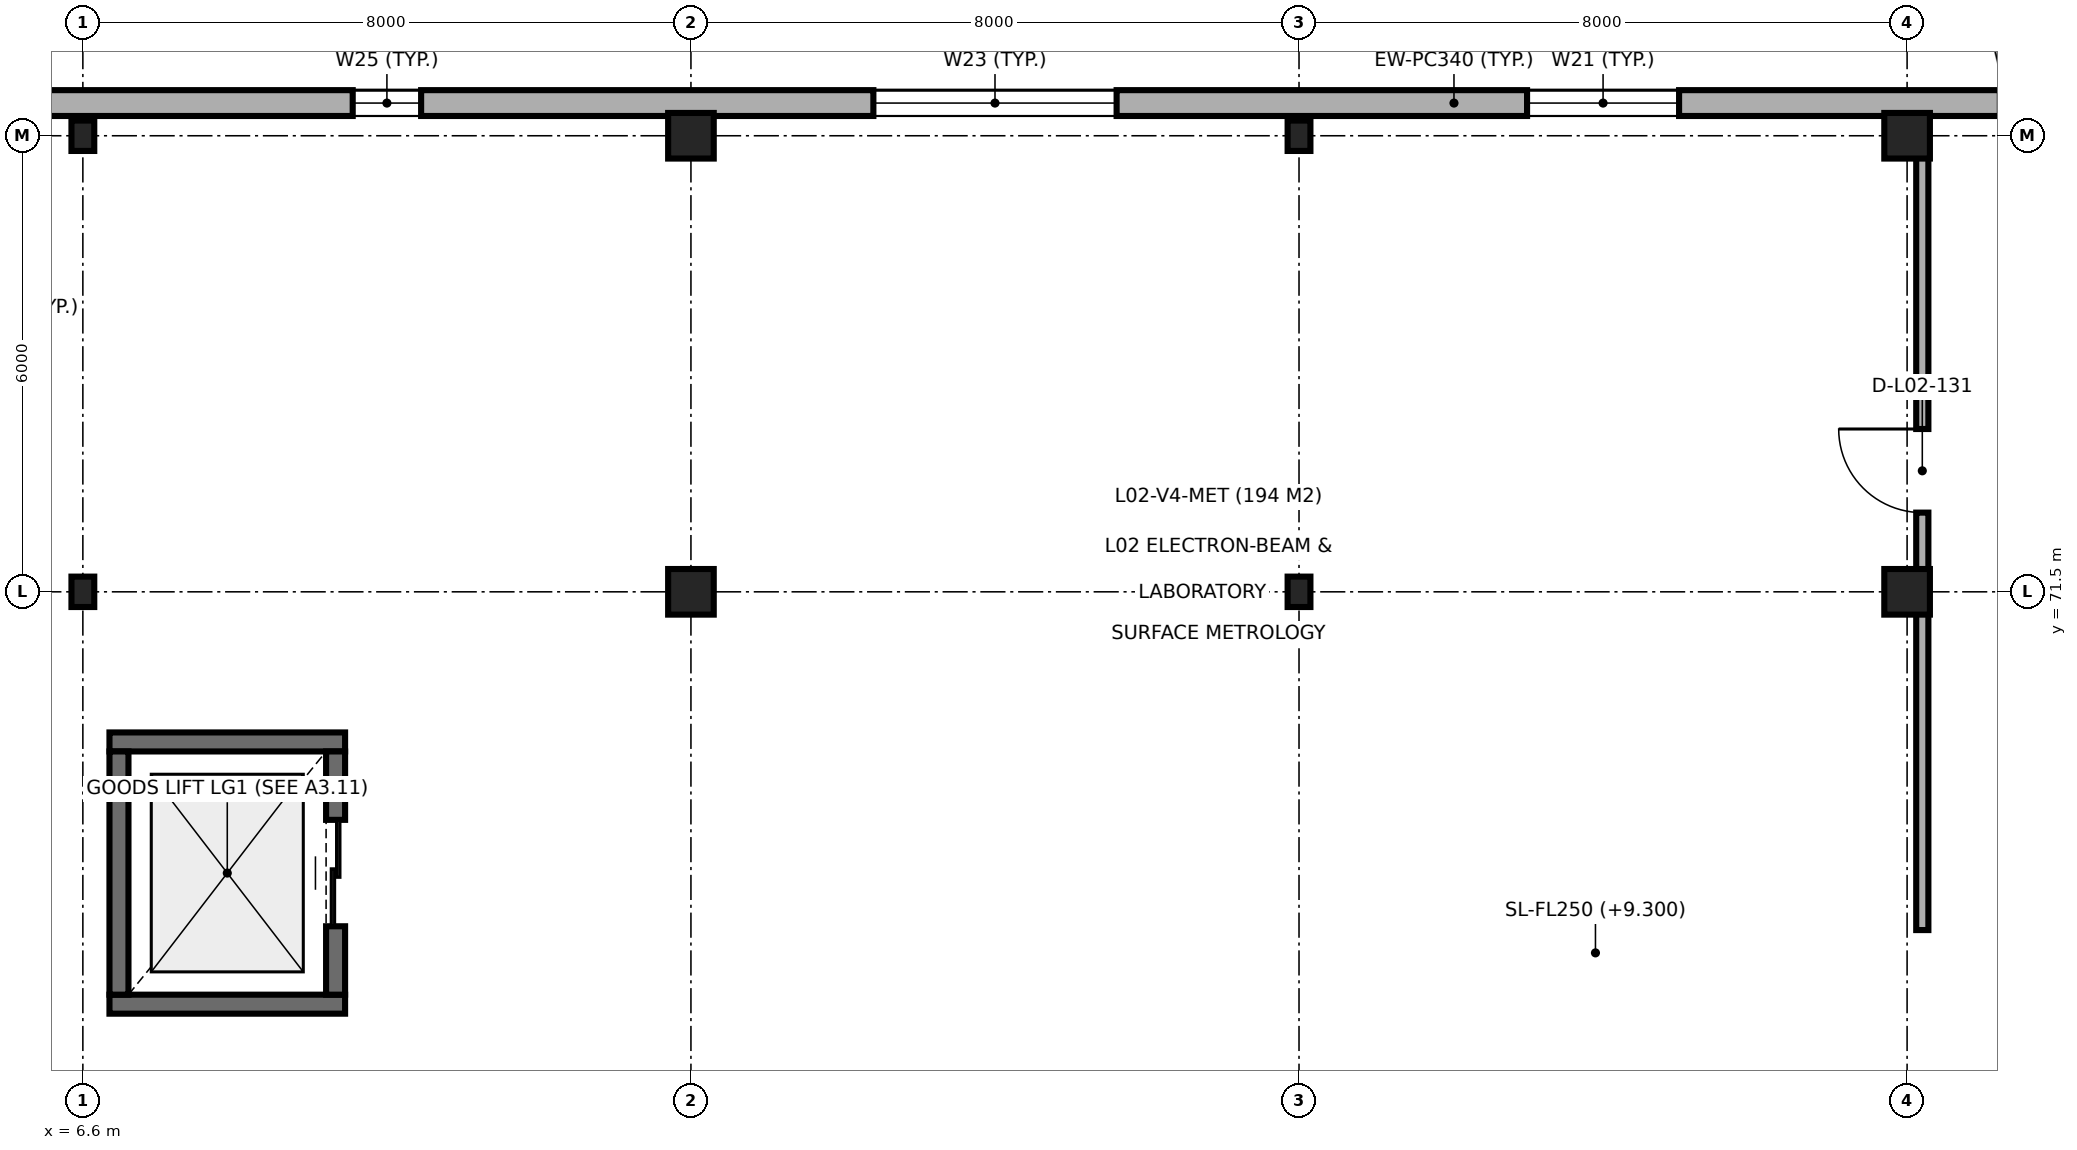
"""IFC4 building model, lengths in metres.
Left out: names, types, materials, properties, quantities, classifications, styles, units other than length and angle.
Written with IfcOpenShell. Run it as: python <this file> out.ifc"""

import sys

from ifc_helpers import new_model, si_unit, direction, frame, frame_2d, origin, origin_2d, place, context, subcontext, project, spatial, rectangle, i_section, extrude, element, fill, save


model = new_model("IFC4")
c1 = context("Model", 3, precision=1e-05, world=origin(), true_north=direction((0.0, 1.0)))
c2 = subcontext(c1, "Body", "Model", "MODEL_VIEW")
j1 = project(units=[si_unit("LENGTHUNIT", "METRE"), si_unit("PLANEANGLEUNIT", "RADIAN")], contexts=[c1])
p1 = place(None, origin())
s1 = spatial("IfcSite", under=j1, at=p1, CompositionType="ELEMENT")
p2 = place(p1, origin())
s2 = spatial("IfcBuilding", under=s1, at=p2, CompositionType="ELEMENT")
p3 = place(p2, frame((0.0, 0.0, 9.3)))
s3 = spatial("IfcBuildingStorey", under=s2, at=p3, CompositionType="ELEMENT", Elevation=9.3)
for number, where, z_axis, x_axis in (
    (1, (6.6, 71.5, 0.0), (0.0, 0.0, 1.0), (1.0, 0.0, 0.0)),
    (2, (6.6, 77.5, 0.0), (0.0, 0.0, 1.0), (1.0, 0.0, 0.0)),
):
    element("IfcColumn", number, at=place(p3, frame(where, z_axis=z_axis, x_axis=x_axis)), inside=s3, PredefinedType="COLUMN", context=c2, shape_type="SweptSolid", body=[
        extrude(i_section(OverallWidth=0.3, OverallDepth=0.4, WebThickness=0.013, FlangeThickness=0.024, FilletRadius=0.027, at=origin_2d()), origin(), (0.0, 0.0, 1.0), 4.5),
    ])
for number, where, z_axis, x_axis in (
    (3, (14.6, 71.5, 0.0), (0.0, 0.0, 1.0), (1.0, 0.0, 0.0)),
    (4, (14.6, 77.5, 0.0), (0.0, 0.0, 1.0), (1.0, 0.0, 0.0)),
):
    element("IfcColumn", number, at=place(p3, frame(where, z_axis=z_axis, x_axis=x_axis)), inside=s3, PredefinedType="COLUMN", context=c2, shape_type="SweptSolid", body=[
        extrude(rectangle(XDim=0.6, YDim=0.6, at=origin_2d()), origin(), (0.0, 0.0, 1.0), 4.5),
    ])
for number, where, z_axis, x_axis in (
    (5, (22.6, 71.5, 0.0), (0.0, 0.0, 1.0), (1.0, 0.0, 0.0)),
    (6, (22.6, 77.5, 0.0), (0.0, 0.0, 1.0), (1.0, 0.0, 0.0)),
):
    element("IfcColumn", number, at=place(p3, frame(where, z_axis=z_axis, x_axis=x_axis)), inside=s3, PredefinedType="COLUMN", context=c2, shape_type="SweptSolid", body=[
        extrude(i_section(OverallWidth=0.3, OverallDepth=0.4, WebThickness=0.013, FlangeThickness=0.024, FilletRadius=0.027, at=origin_2d()), origin(), (0.0, 0.0, 1.0), 4.5),
    ])
for number, where, z_axis, x_axis in (
    (7, (30.6, 71.5, 0.0), (0.0, 0.0, 1.0), (1.0, 0.0, 0.0)),
    (8, (30.6, 77.5, 0.0), (0.0, 0.0, 1.0), (1.0, 0.0, 0.0)),
):
    element("IfcColumn", number, at=place(p3, frame(where, z_axis=z_axis, x_axis=x_axis)), inside=s3, PredefinedType="COLUMN", context=c2, shape_type="SweptSolid", body=[
        extrude(rectangle(XDim=0.6, YDim=0.6, at=origin_2d()), origin(), (0.0, 0.0, 1.0), 4.5),
    ])
for number, where, z_axis, x_axis in (
    (9, (6.95, 66.075, 0.0), (0.0, 0.0, 1.0), (1.0, 0.0, 0.0)),
    (10, (10.05, 69.525, 0.0), (0.0, 0.0, 1.0), (-1.0, 0.0, 0.0)),
):
    element("IfcWall", number, at=place(p3, frame(where, z_axis=z_axis, x_axis=x_axis)), inside=s3, PredefinedType="SHEAR", context=c2, shape_type="SweptSolid", body=[
        extrude(rectangle(XDim=3.1, YDim=0.25, at=frame_2d((1.55, 0.0))), origin(), (0.0, 0.0, 1.0), 4.5),
    ])
p4 = place(p3, frame((7.075, 69.4, 0.0), z_axis=(0.0, 0.0, 1.0), x_axis=(0.0, -1.0, 0.0)))
e11 = element("IfcWall", 11, at=p4, inside=s3, PredefinedType="SHEAR", context=c2, shape_type="SweptSolid", body=[
    extrude(rectangle(XDim=3.2, YDim=0.25, at=frame_2d((1.6, 0.0))), origin(), (0.0, 0.0, 1.0), 4.5),
])
p5 = place(p3, frame((9.925, 66.2, 0.0), z_axis=(0.0, 0.0, 1.0), x_axis=(0.0, 1.0, 0.0)))
e12 = element("IfcWall", 12, at=p5, inside=s3, PredefinedType="SHEAR", context=c2, shape_type="SweptSolid", body=[
    extrude(rectangle(XDim=3.2, YDim=0.25, at=frame_2d((1.6, 0.0))), origin(), (0.0, 0.0, 1.0), 4.5),
])
p6 = place(p5, frame((0.9, 0.0, 0.0)))
e13 = element("IfcOpeningElement", 13, at=p6, cuts=e12, PredefinedType="OPENING", context=c2, shape_type="SweptSolid", body=[
    extrude(rectangle(XDim=1.4, YDim=2.2, at=frame_2d((0.7, 1.1))), frame((0.0, 0.135, 0.0), z_axis=(0.0, -1.0, 0.0), x_axis=(1.0, 0.0, 0.0)), (0.0, 0.0, 1.0), 0.27),
])
p7 = place(p3, frame((43.677, 77.93, 0.0), z_axis=(0.0, 0.0, 1.0), x_axis=(-1.0, 0.0, 0.0)))
e14 = element("IfcWall", 14, at=p7, inside=s3, PredefinedType="SOLIDWALL", context=c2, shape_type="SweptSolid", body=[
    extrude(rectangle(XDim=38.077, YDim=0.34, at=frame_2d((19.039, 0.0))), origin(), (0.0, 0.0, 1.0), 4.25),
])
p8 = place(p7, frame((6.277, 0.0, 0.0)))
e15 = element("IfcOpeningElement", 15, at=p8, cuts=e14, PredefinedType="OPENING", context=c2, shape_type="SweptSolid", body=[
    extrude(rectangle(XDim=1.6, YDim=2.2, at=frame_2d((0.8, 1.1))), frame((0.0, 0.18, 0.0), z_axis=(0.0, -1.0, 0.0), x_axis=(1.0, 0.0, 0.0)), (0.0, 0.0, 1.0), 0.36),
])
p9 = place(p7, frame((1.689, 0.0, 0.9)))
e16 = element("IfcOpeningElement", 16, at=p9, cuts=e14, PredefinedType="OPENING", context=c2, shape_type="SweptSolid", body=[
    extrude(rectangle(XDim=1.8, YDim=1.5, at=frame_2d((0.9, 0.75))), frame((0.0, 0.18, 0.0), z_axis=(0.0, -1.0, 0.0), x_axis=(1.0, 0.0, 0.0)), (0.0, 0.0, 1.0), 0.36),
])
p10 = place(p7, frame((10.657, 0.0, 0.9)))
e17 = element("IfcOpeningElement", 17, at=p10, cuts=e14, PredefinedType="OPENING", context=c2, shape_type="SweptSolid", body=[
    extrude(rectangle(XDim=1.2, YDim=2.4, at=frame_2d((0.6, 1.2))), frame((0.0, 0.18, 0.0), z_axis=(0.0, -1.0, 0.0), x_axis=(1.0, 0.0, 0.0)), (0.0, 0.0, 1.0), 0.36),
])
p11 = place(p7, frame((16.077, 0.0, 0.9)))
e18 = element("IfcOpeningElement", 18, at=p11, cuts=e14, PredefinedType="OPENING", context=c2, shape_type="SweptSolid", body=[
    extrude(rectangle(XDim=2.0, YDim=2.4, at=frame_2d((1.0, 1.2))), frame((0.0, 0.18, 0.0), z_axis=(0.0, -1.0, 0.0), x_axis=(1.0, 0.0, 0.0)), (0.0, 0.0, 1.0), 0.36),
])
p12 = place(p7, frame((23.477, 0.0, 0.9)))
e19 = element("IfcOpeningElement", 19, at=p12, cuts=e14, PredefinedType="OPENING", context=c2, shape_type="SweptSolid", body=[
    extrude(rectangle(XDim=3.2, YDim=2.4, at=frame_2d((1.6, 1.2))), frame((0.0, 0.18, 0.0), z_axis=(0.0, -1.0, 0.0), x_axis=(1.0, 0.0, 0.0)), (0.0, 0.0, 1.0), 0.36),
])
p13 = place(p7, frame((32.627, 0.0, 0.9)))
e20 = element("IfcOpeningElement", 20, at=p13, cuts=e14, PredefinedType="OPENING", context=c2, shape_type="SweptSolid", body=[
    extrude(rectangle(XDim=0.9, YDim=1.4, at=frame_2d((0.45, 0.7))), frame((0.0, 0.18, 0.0), z_axis=(0.0, -1.0, 0.0), x_axis=(1.0, 0.0, 0.0)), (0.0, 0.0, 1.0), 0.36),
])
p14 = place(p3, frame((30.8, 67.05, 0.0), z_axis=(0.0, 0.0, 1.0), x_axis=(0.0, 1.0, 0.0)))
e21 = element("IfcWall", 21, at=p14, inside=s3, PredefinedType="PARTITIONING", context=c2, shape_type="SweptSolid", body=[
    extrude(rectangle(XDim=4.2, YDim=0.16, at=frame_2d((2.1, 0.0))), origin(), (0.0, 0.0, 1.0), 3.85),
])
p15 = place(p3, frame((30.8, 71.75, 0.0), z_axis=(0.0, 0.0, 1.0), x_axis=(0.0, 1.0, 0.0)))
e22 = element("IfcWall", 22, at=p15, inside=s3, PredefinedType="PARTITIONING", context=c2, shape_type="SweptSolid", body=[
    extrude(rectangle(XDim=5.5, YDim=0.16, at=frame_2d((2.75, 0.0))), origin(), (0.0, 0.0, 1.0), 3.85),
])
p16 = place(p15, frame((0.792, 0.0, 0.0)))
e23 = element("IfcOpeningElement", 23, at=p16, cuts=e22, PredefinedType="OPENING", context=c2, shape_type="SweptSolid", body=[
    extrude(rectangle(XDim=1.1, YDim=2.15, at=frame_2d((0.55, 1.075))), frame((0.0, 0.09, 0.0), z_axis=(0.0, -1.0, 0.0), x_axis=(1.0, 0.0, 0.0)), (0.0, 0.0, 1.0), 0.18),
])
p17 = place(p6, origin())
e24 = element("IfcDoor", 24, at=p17, inside=s3, OperationType="DOUBLE_DOOR_SLIDING", PredefinedType="DOOR", context=c2, shape_type="SweptSolid", body=[
    extrude(rectangle(XDim=1.4, YDim=2.2, at=frame_2d((0.7, 1.1))), frame((0.0, 0.025, 0.0), z_axis=(0.0, -1.0, 0.0), x_axis=(1.0, 0.0, 0.0)), (0.0, 0.0, 1.0), 0.05),
])
fill(e13, e24)
p18 = place(p11, origin())
e25 = element("IfcWindow", 25, at=p18, inside=s3, PartitioningType="SINGLE_PANEL", PredefinedType="WINDOW", context=c2, shape_type="SweptSolid", body=[
    extrude(rectangle(XDim=2.0, YDim=2.4, at=frame_2d((1.0, 1.2))), frame((0.0, 0.03, 0.0), z_axis=(0.0, -1.0, 0.0), x_axis=(1.0, 0.0, 0.0)), (0.0, 0.0, 1.0), 0.06),
])
fill(e18, e25)
p19 = place(p12, origin())
e26 = element("IfcWindow", 26, at=p19, inside=s3, PartitioningType="SINGLE_PANEL", PredefinedType="WINDOW", context=c2, shape_type="SweptSolid", body=[
    extrude(rectangle(XDim=3.2, YDim=2.4, at=frame_2d((1.6, 1.2))), frame((0.0, 0.03, 0.0), z_axis=(0.0, -1.0, 0.0), x_axis=(1.0, 0.0, 0.0)), (0.0, 0.0, 1.0), 0.06),
])
fill(e19, e26)
p20 = place(p13, origin())
e27 = element("IfcWindow", 27, at=p20, inside=s3, PartitioningType="SINGLE_PANEL", PredefinedType="WINDOW", context=c2, shape_type="SweptSolid", body=[
    extrude(rectangle(XDim=0.9, YDim=1.4, at=frame_2d((0.45, 0.7))), frame((0.0, 0.03, 0.0), z_axis=(0.0, -1.0, 0.0), x_axis=(1.0, 0.0, 0.0)), (0.0, 0.0, 1.0), 0.06),
])
fill(e20, e27)
p21 = place(p16, origin())
e28 = element("IfcDoor", 28, at=p21, inside=s3, OperationType="SINGLE_SWING_RIGHT", PredefinedType="DOOR", context=c2, shape_type="SweptSolid", body=[
    extrude(rectangle(XDim=1.1, YDim=2.15, at=frame_2d((0.55, 1.075))), frame((0.0, 0.025, 0.0), z_axis=(0.0, -1.0, 0.0), x_axis=(1.0, 0.0, 0.0)), (0.0, 0.0, 1.0), 0.05),
])
fill(e23, e28)
save(model, sys.argv[1])
